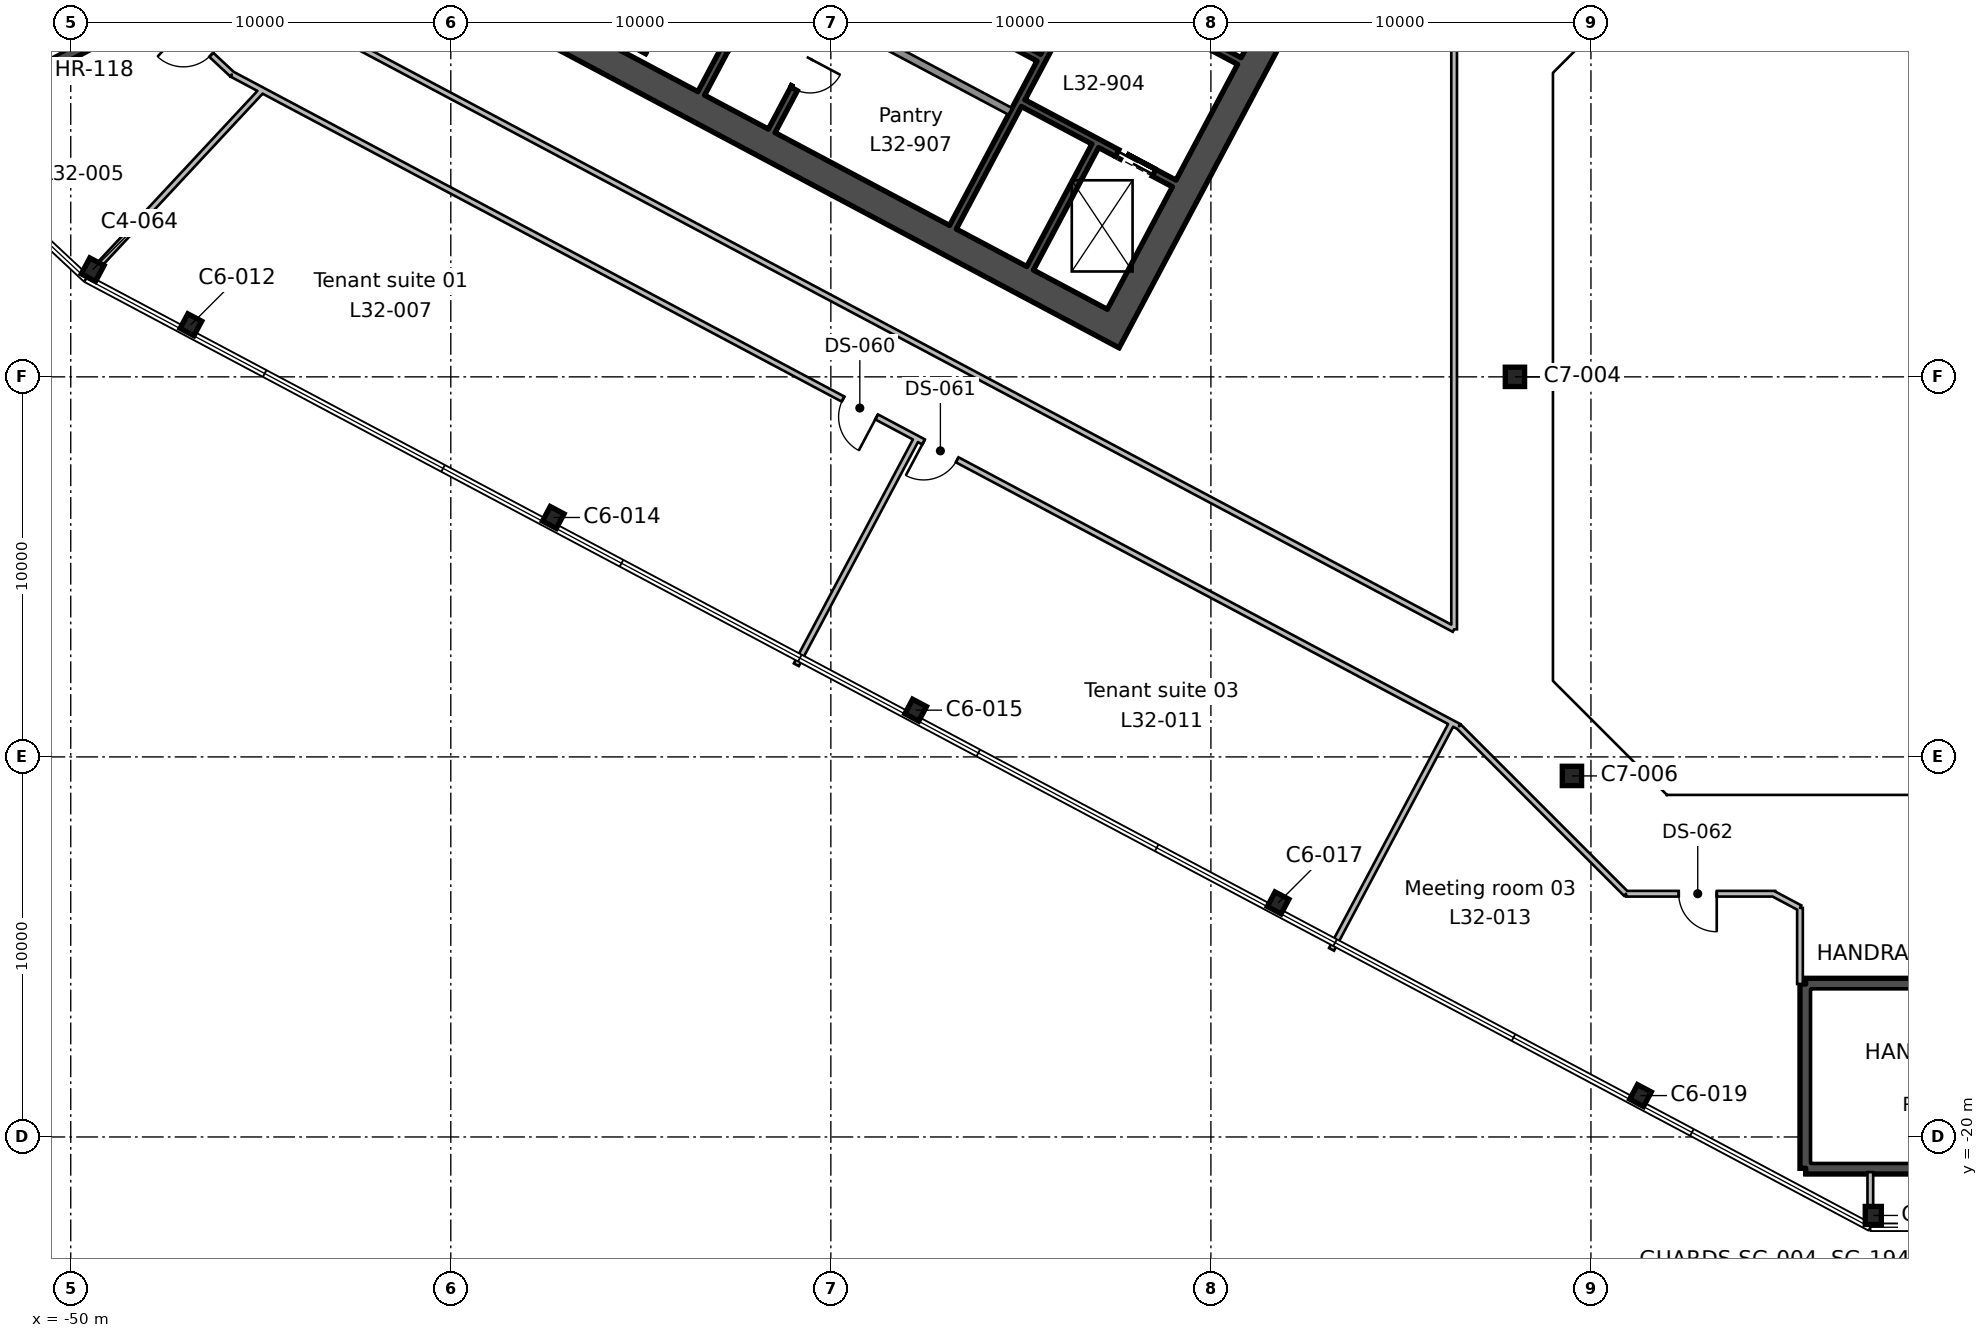
"""IFC4 building model, lengths in metres.
Left out: names, types, materials, properties, quantities, classifications, styles, units other than length and angle.
Written with IfcOpenShell. Run it as: python <this file> out.ifc"""

import sys

from ifc_helpers import new_model, si_unit, direction, frame, frame_2d, origin, origin_2d, place, context, subcontext, project, spatial, rectangle, hollow_rectangle, i_section, extrude, element, fill, save


model = new_model("IFC4")
c1 = context("Model", 3, precision=1e-05, world=origin(), true_north=direction((0.0, 1.0)))
c2 = subcontext(c1, "Body", "Model", "MODEL_VIEW")
j1 = project(units=[si_unit("LENGTHUNIT", "METRE"), si_unit("PLANEANGLEUNIT", "RADIAN")], contexts=[c1])
p1 = place(None, origin())
s1 = spatial("IfcSite", under=j1, at=p1, CompositionType="ELEMENT")
p2 = place(p1, origin())
s2 = spatial("IfcBuilding", under=s1, at=p2, CompositionType="ELEMENT")
p3 = place(p2, frame((0.0, 0.0, 154.2)))
s3 = spatial("IfcBuildingStorey", under=s2, at=p3, CompositionType="ELEMENT", Elevation=154.2)
p4 = place(p3, frame((-2.571, -22.065, 0.0), z_axis=(0.0, 0.0, 1.0), x_axis=(1.0, 0.0, 0.0)))
e1 = element("IfcColumn", 1, at=p4, inside=s3, PredefinedType="COLUMN", context=c2, shape_type="SweptSolid", body=[
    extrude(i_section(OverallWidth=0.424, OverallDepth=0.475, WebThickness=0.048, FlangeThickness=0.077, FilletRadius=0.015, at=origin_2d()), origin(), (0.0, 0.0, 1.0), 4.0),
])
for number, where, z_axis, x_axis in (
    (2, (-8.696, -18.911, 0.0), (0.0, 0.0, 1.0), (0.883, -0.469, 0.0)),
    (3, (-18.232, -13.841, 0.0), (0.0, 0.0, 1.0), (0.883, -0.469, 0.0)),
):
    element("IfcColumn", number, at=place(p3, frame(where, z_axis=z_axis, x_axis=x_axis)), inside=s3, PredefinedType="COLUMN", context=c2, shape_type="SweptSolid", body=[
        extrude(i_section(OverallWidth=0.412, OverallDepth=0.434, WebThickness=0.036, FlangeThickness=0.057, FilletRadius=0.015, at=origin_2d()), origin(), (0.0, 0.0, 1.0), 4.0),
    ])
p5 = place(p3, frame((-10.5, -10.5, 0.0), z_axis=(0.0, 0.0, 1.0), x_axis=(1.0, 0.0, 0.0)))
e4 = element("IfcColumn", 4, at=p5, inside=s3, PredefinedType="COLUMN", context=c2, shape_type="SweptSolid", body=[
    extrude(hollow_rectangle(XDim=0.508, YDim=0.508, WallThickness=0.012, InnerFilletRadius=0.006, OuterFilletRadius=0.018, at=origin_2d()), origin(), (0.0, 0.0, 1.0), 4.0),
])
for number, where, z_axis, x_axis in (
    (5, (-27.768, -8.77, 0.0), (0.0, 0.0, 1.0), (0.883, -0.469, 0.0)),
    (6, (-37.304, -3.7, 0.0), (0.0, 0.0, 1.0), (0.883, -0.469, 0.0)),
):
    element("IfcColumn", number, at=place(p3, frame(where, z_axis=z_axis, x_axis=x_axis)), inside=s3, PredefinedType="COLUMN", context=c2, shape_type="SweptSolid", body=[
        extrude(i_section(OverallWidth=0.412, OverallDepth=0.434, WebThickness=0.036, FlangeThickness=0.057, FilletRadius=0.015, at=origin_2d()), origin(), (0.0, 0.0, 1.0), 4.0),
    ])
p6 = place(p3, frame((-12.0, 0.0, 0.0), z_axis=(0.0, 0.0, 1.0), x_axis=(1.0, 0.0, 0.0)))
e7 = element("IfcColumn", 7, at=p6, inside=s3, PredefinedType="COLUMN", context=c2, shape_type="SweptSolid", body=[
    extrude(hollow_rectangle(XDim=0.508, YDim=0.508, WallThickness=0.012, InnerFilletRadius=0.006, OuterFilletRadius=0.018, at=origin_2d()), origin(), (0.0, 0.0, 1.0), 4.0),
])
p7 = place(p3, frame((-46.839, 1.37, 0.0), z_axis=(0.0, 0.0, 1.0), x_axis=(0.882947592859, -0.469471562786, 0.0)))
e8 = element("IfcColumn", 8, at=p7, inside=s3, PredefinedType="COLUMN", context=c2, shape_type="SweptSolid", body=[
    extrude(i_section(OverallWidth=0.412, OverallDepth=0.434, WebThickness=0.036, FlangeThickness=0.057, FilletRadius=0.015, at=origin_2d()), origin(), (0.0, 0.0, 1.0), 4.0),
])
p8 = place(p3, frame((-49.423, 2.82, 0.0), z_axis=(0.0, 0.0, 1.0), x_axis=(0.882947592859, -0.469471562786, 0.0)))
e9 = element("IfcColumn", 9, at=p8, inside=s3, PredefinedType="COLUMN", context=c2, shape_type="SweptSolid", body=[
    extrude(i_section(OverallWidth=0.424, OverallDepth=0.475, WebThickness=0.048, FlangeThickness=0.077, FilletRadius=0.015, at=origin_2d()), origin(), (0.0, 0.0, 1.0), 4.0),
])
p9 = place(p3, frame((-13.498, 18.333, 0.0), z_axis=(0.0, 0.0, 1.0), x_axis=(-0.469469918705, -0.88294846703, 0.0)))
e10 = element("IfcWall", 10, at=p9, inside=s3, PredefinedType="SHEAR", context=c2, shape_type="SweptSolid", body=[
    extrude(rectangle(XDim=19.7, YDim=0.75, at=frame_2d((9.85, 0.0))), origin(), (0.0, 0.0, 1.0), 4.0),
])
p10 = place(p9, frame((6.85, 0.0, 0.0)))
e11 = element("IfcOpeningElement", 11, at=p10, cuts=e10, PredefinedType="OPENING", context=c2, shape_type="SweptSolid", body=[
    extrude(rectangle(XDim=2.4, YDim=2.4, at=frame_2d((1.2, 1.2))), frame((0.0, 0.385, 0.0), z_axis=(0.0, -1.0, 0.0), x_axis=(1.0, 0.0, 0.0)), (0.0, 0.0, 1.0), 0.77),
])
p11 = place(p3, frame((-22.902, 1.446, 0.0), z_axis=(0.0, 0.0, 1.0), x_axis=(-0.88294509198, 0.469476266226, 0.0)))
e12 = element("IfcWall", 12, at=p11, inside=s3, PredefinedType="SHEAR", context=c2, shape_type="SweptSolid", body=[
    extrude(rectangle(XDim=20.2, YDim=0.75, at=frame_2d((10.1, 0.0))), origin(), (0.0, 0.0, 1.0), 4.0),
])
p12 = place(p3, frame((-23.043, 6.08, 0.0), z_axis=(0.0, 0.0, 1.0), x_axis=(-0.469494272526, -0.882935517501, 0.0)))
e13 = element("IfcWall", 13, at=p12, inside=s3, PredefinedType="SHEAR", context=c2, shape_type="SweptSolid", body=[
    extrude(rectangle(XDim=3.65, YDim=0.2, at=frame_2d((1.825, 0.0))), origin(), (0.0, 0.0, 1.0), 4.0),
])
p13 = place(p3, frame((-23.36, 10.382, 0.0), z_axis=(0.0, 0.0, 1.0), x_axis=(-0.469480409012, -0.88294288918, 0.0)))
e14 = element("IfcWall", 14, at=p13, inside=s3, PredefinedType="SHEAR", context=c2, shape_type="SweptSolid", body=[
    extrude(rectangle(XDim=7.3, YDim=0.2, at=frame_2d((3.65, 0.0))), origin(), (0.0, 0.0, 1.0), 4.0),
])
p14 = place(p3, frame((-28.128, 12.917, 0.0), z_axis=(0.0, 0.0, 1.0), x_axis=(-0.469454336211, -0.882956752176, 0.0)))
e15 = element("IfcWall", 15, at=p14, inside=s3, PredefinedType="SHEAR", context=c2, shape_type="SweptSolid", body=[
    extrude(rectangle(XDim=7.3, YDim=0.2, at=frame_2d((3.65, 0.0))), origin(), (0.0, 0.0, 1.0), 4.0),
])
p15 = place(p14, frame((2.65, 0.0, 0.0)))
e16 = element("IfcOpeningElement", 16, at=p15, cuts=e15, PredefinedType="OPENING", context=c2, shape_type="SweptSolid", body=[
    extrude(rectangle(XDim=0.9, YDim=2.1, at=frame_2d((0.45, 1.05))), frame((0.0, 0.11, 0.0), z_axis=(0.0, -1.0, 0.0), x_axis=(1.0, 0.0, 0.0)), (0.0, 0.0, 1.0), 0.22),
])
p16 = place(p14, frame((5.15, 0.0, 0.0)))
e17 = element("IfcOpeningElement", 17, at=p16, cuts=e15, PredefinedType="OPENING", context=c2, shape_type="SweptSolid", body=[
    extrude(rectangle(XDim=0.9, YDim=2.1, at=frame_2d((0.45, 1.05))), frame((0.0, 0.11, 0.0), z_axis=(0.0, -1.0, 0.0), x_axis=(1.0, 0.0, 0.0)), (0.0, 0.0, 1.0), 0.22),
])
p17 = place(p3, frame((-29.982, 13.903, 0.0), z_axis=(0.0, 0.0, 1.0), x_axis=(-0.469454336211, -0.882956752176, 0.0)))
e18 = element("IfcWall", 18, at=p17, inside=s3, PredefinedType="SHEAR", context=c2, shape_type="SweptSolid", body=[
    extrude(rectangle(XDim=7.3, YDim=0.2, at=frame_2d((3.65, 0.0))), origin(), (0.0, 0.0, 1.0), 4.0),
])
p18 = place(p17, frame((4.8, 0.0, 0.0)))
e19 = element("IfcOpeningElement", 19, at=p18, cuts=e18, PredefinedType="OPENING", context=c2, shape_type="SweptSolid", body=[
    extrude(rectangle(XDim=1.2, YDim=2.1, at=frame_2d((0.6, 1.05))), frame((0.0, 0.11, 0.0), z_axis=(0.0, -1.0, 0.0), x_axis=(1.0, 0.0, 0.0)), (0.0, 0.0, 1.0), 0.22),
])
p19 = place(p3, frame((-19.252, 8.311, 0.0), z_axis=(0.0, 0.0, 1.0), x_axis=(-0.882955722218, 0.469456273365, 0.0)))
e20 = element("IfcWall", 20, at=p19, inside=s3, PredefinedType="SHEAR", context=c2, shape_type="SweptSolid", body=[
    extrude(rectangle(XDim=10.0, YDim=0.2, at=frame_2d((5.0, 0.0))), origin(), (0.0, 0.0, 1.0), 4.0),
])
p20 = place(p19, frame((2.1, 0.0, 0.0)))
e21 = element("IfcOpeningElement", 21, at=p20, cuts=e20, PredefinedType="OPENING", context=c2, shape_type="SweptSolid", body=[
    extrude(rectangle(XDim=1.2, YDim=2.1, at=frame_2d((0.6, 1.05))), frame((0.0, 0.11, 0.0), z_axis=(0.0, -1.0, 0.0), x_axis=(1.0, 0.0, 0.0)), (0.0, 0.0, 1.0), 0.22),
])
p21 = place(p3, frame((-24.528, 8.398, 0.0), z_axis=(0.0, 0.0, 1.0), x_axis=(-0.882953967957, 0.469459572775, 0.0)))
e22 = element("IfcWall", 22, at=p21, inside=s3, PredefinedType="SHEAR", context=c2, shape_type="SweptSolid", body=[
    extrude(rectangle(XDim=5.2, YDim=0.2, at=frame_2d((2.6, 0.0))), origin(), (0.0, 0.0, 1.0), 4.0),
])
p22 = place(p3, frame((-20.965, 5.088, 0.0), z_axis=(0.0, 0.0, 1.0), x_axis=(-0.882925986334, 0.469512196493, 0.0)))
e23 = element("IfcWall", 23, at=p22, inside=s3, PredefinedType="SHEAR", context=c2, shape_type="SweptSolid", body=[
    extrude(rectangle(XDim=4.5, YDim=0.2, at=frame_2d((2.25, 0.0))), origin(), (0.0, 0.0, 1.0), 4.0),
])
p23 = place(p22, frame((0.6, 0.0, 0.0)))
e24 = element("IfcOpeningElement", 24, at=p23, cuts=e23, PredefinedType="OPENING", context=c2, shape_type="SweptSolid", body=[
    extrude(rectangle(XDim=1.1, YDim=2.1, at=frame_2d((0.55, 1.05))), frame((0.0, 0.11, 0.0), z_axis=(0.0, -1.0, 0.0), x_axis=(1.0, 0.0, 0.0)), (0.0, 0.0, 1.0), 0.22),
])
p24 = place(p3, frame((-25.28, 6.986, 0.0), z_axis=(0.0, 0.0, 1.0), x_axis=(-0.882934506056, 0.469496174655, 0.0)))
e25 = element("IfcWall", 25, at=p24, inside=s3, PredefinedType="SOLIDWALL", context=c2, shape_type="SweptSolid", body=[
    extrude(rectangle(XDim=5.2, YDim=0.2, at=frame_2d((2.6, 0.0))), origin(), (0.0, 0.0, 1.0), 4.0),
])
p25 = place(p3, frame((3.95, -20.825, 0.0), z_axis=(0.0, 0.0, 1.0), x_axis=(-1.0, 0.0, 0.0)))
e26 = element("IfcWall", 26, at=p25, inside=s3, PredefinedType="SHEAR", context=c2, shape_type="SweptSolid", body=[
    extrude(rectangle(XDim=8.3, YDim=0.3, at=frame_2d((4.15, 0.0))), origin(), (0.0, 0.0, 1.0), 4.0),
])
p26 = place(p3, frame((-4.35, -20.825, 0.0), z_axis=(0.0, 0.0, 1.0), x_axis=(0.0, 1.0, 0.0)))
e27 = element("IfcWall", 27, at=p26, inside=s3, PredefinedType="SHEAR", context=c2, shape_type="SweptSolid", body=[
    extrude(rectangle(XDim=4.85, YDim=0.3, at=frame_2d((2.425, 0.0))), origin(), (0.0, 0.0, 1.0), 4.0),
])
p27 = place(p3, frame((-4.35, -15.975, 0.0), z_axis=(0.0, 0.0, 1.0), x_axis=(1.0, 0.0, 0.0)))
e28 = element("IfcWall", 28, at=p27, inside=s3, PredefinedType="SHEAR", context=c2, shape_type="SweptSolid", body=[
    extrude(rectangle(XDim=8.3, YDim=0.3, at=frame_2d((4.15, 0.0))), origin(), (0.0, 0.0, 1.0), 4.0),
])
p28 = place(p27, frame((6.05, 0.0, 0.0)))
e29 = element("IfcOpeningElement", 29, at=p28, cuts=e28, PredefinedType="OPENING", context=c2, shape_type="SweptSolid", body=[
    extrude(rectangle(XDim=1.9, YDim=2.1, at=frame_2d((0.95, 1.05))), frame((0.0, 0.16, 0.0), z_axis=(0.0, -1.0, 0.0), x_axis=(1.0, 0.0, 0.0)), (0.0, 0.0, 1.0), 0.32),
])
p29 = place(p3, frame((-45.297, 11.007, 0.0), z_axis=(0.0, 0.0, 1.0), x_axis=(-0.882951519127, -0.469464178475, 0.0)))
e30 = element("IfcWall", 30, at=p29, inside=s3, PredefinedType="SHEAR", context=c2, shape_type="SweptSolid", body=[
    extrude(rectangle(XDim=8.3, YDim=0.3, at=frame_2d((4.15, 0.0))), origin(), (0.0, 0.0, 1.0), 4.0),
])
p30 = place(p3, frame((-44.967, 7.544, 0.0), z_axis=(0.0, 0.0, 1.0), x_axis=(-0.681977908196, -0.731372772759, 0.0)))
e31 = element("IfcWall", 31, at=p30, inside=s3, PredefinedType="PARTITIONING", context=c2, shape_type="SweptSolid", body=[
    extrude(rectangle(XDim=6.238, YDim=0.15, at=frame_2d((3.119, 0.0))), origin(), (0.0, 0.0, 1.0), 3.64),
])
p31 = place(p3, frame((-27.739, -1.616, 0.0), z_axis=(0.0, 0.0, 1.0), x_axis=(-0.469581783496, -0.882888978643, 0.0)))
e32 = element("IfcWall", 32, at=p31, inside=s3, PredefinedType="PARTITIONING", context=c2, shape_type="SweptSolid", body=[
    extrude(rectangle(XDim=6.75, YDim=0.15, at=frame_2d((3.375, 0.0))), origin(), (0.0, 0.0, 1.0), 3.64),
])
p32 = place(p3, frame((-45.02, 7.572, 0.0), z_axis=(0.0, 0.0, 1.0), x_axis=(-0.88288015149, 0.46959837958, 0.0)))
e33 = element("IfcWall", 33, at=p32, inside=s3, PredefinedType="PARTITIONING", context=c2, shape_type="SweptSolid", body=[
    extrude(rectangle(XDim=0.832, YDim=0.15, at=frame_2d((0.416, 0.0))), origin(), (0.0, 0.0, 1.0), 3.64),
])
p33 = place(p3, frame((-45.755, 7.963, 0.0), z_axis=(0.0, 0.0, 1.0), x_axis=(-0.731175081237, 0.682189856695, 0.0)))
e34 = element("IfcWall", 34, at=p33, inside=s3, PredefinedType="PARTITIONING", context=c2, shape_type="SweptSolid", body=[
    extrude(rectangle(XDim=2.507, YDim=0.15, at=frame_2d((1.253, 0.0))), origin(), (0.0, 0.0, 1.0), 3.64),
])
p34 = place(p33, frame((0.75, 0.0, 0.0)))
e35 = element("IfcOpeningElement", 35, at=p34, cuts=e34, PredefinedType="OPENING", context=c2, shape_type="SweptSolid", body=[
    extrude(rectangle(XDim=1.0, YDim=2.1, at=frame_2d((0.5, 1.05))), frame((0.0, 0.085, 0.0), z_axis=(0.0, -1.0, 0.0), x_axis=(1.0, 0.0, 0.0)), (0.0, 0.0, 1.0), 0.17),
])
p35 = place(p3, frame((-13.6, 9.077, 0.0), z_axis=(0.0, 0.0, 1.0), x_axis=(0.0, -1.0, 0.0)))
e36 = element("IfcWall", 36, at=p35, inside=s3, PredefinedType="PARTITIONING", context=c2, shape_type="SweptSolid", body=[
    extrude(rectangle(XDim=15.72, YDim=0.15, at=frame_2d((7.86, 0.0))), origin(), (0.0, 0.0, 1.0), 3.64),
])
p36 = place(p3, frame((-13.6, -6.643, 0.0), z_axis=(0.0, 0.0, 1.0), x_axis=(-0.882949199944, 0.469468540287, 0.0)))
e37 = element("IfcWall", 37, at=p36, inside=s3, PredefinedType="PARTITIONING", context=c2, shape_type="SweptSolid", body=[
    extrude(rectangle(XDim=34.959, YDim=0.15, at=frame_2d((17.479, 0.0))), origin(), (0.0, 0.0, 1.0), 3.64),
])
p37 = place(p3, frame((-13.477, -9.2, 0.0), z_axis=(0.0, 0.0, 1.0), x_axis=(-0.882944359403, 0.469477643981, 0.0)))
e38 = element("IfcWall", 38, at=p37, inside=s3, PredefinedType="PARTITIONING", context=c2, shape_type="SweptSolid", body=[
    extrude(rectangle(XDim=35.725, YDim=0.15, at=frame_2d((17.862, 0.0))), origin(), (0.0, 0.0, 1.0), 3.64),
])
p38 = place(p37, frame((17.35, 0.0, 0.0)))
e39 = element("IfcOpeningElement", 39, at=p38, cuts=e38, PredefinedType="OPENING", context=c2, shape_type="SweptSolid", body=[
    extrude(rectangle(XDim=1.0, YDim=2.1, at=frame_2d((0.5, 1.05))), frame((0.0, 0.085, 0.0), z_axis=(0.0, -1.0, 0.0), x_axis=(1.0, 0.0, 0.0)), (0.0, 0.0, 1.0), 0.17),
])
p39 = place(p37, frame((14.949, 0.0, 0.0)))
e40 = element("IfcOpeningElement", 40, at=p39, cuts=e38, PredefinedType="OPENING", context=c2, shape_type="SweptSolid", body=[
    extrude(rectangle(XDim=1.0, YDim=2.1, at=frame_2d((0.5, 1.05))), frame((0.0, 0.085, 0.0), z_axis=(0.0, -1.0, 0.0), x_axis=(1.0, 0.0, 0.0)), (0.0, 0.0, 1.0), 0.17),
])
p40 = place(p3, frame((-13.657, -9.104, 0.0), z_axis=(0.0, 0.0, 1.0), x_axis=(-0.469469006851, -0.882948951869, 0.0)))
e41 = element("IfcWall", 41, at=p40, inside=s3, PredefinedType="PARTITIONING", context=c2, shape_type="SweptSolid", body=[
    extrude(rectangle(XDim=6.75, YDim=0.15, at=frame_2d((3.375, 0.0))), origin(), (0.0, 0.0, 1.0), 3.64),
])
p41 = place(p3, frame((-5.151, -13.6, 0.0), z_axis=(0.0, 0.0, 1.0), x_axis=(-1.0, 0.0, 0.0)))
e42 = element("IfcWall", 42, at=p41, inside=s3, PredefinedType="PARTITIONING", context=c2, shape_type="SweptSolid", body=[
    extrude(rectangle(XDim=3.926, YDim=0.15, at=frame_2d((1.963, 0.0))), origin(), (0.0, 0.0, 1.0), 3.64),
])
p42 = place(p41, frame((1.539, 0.0, 0.0)))
e43 = element("IfcOpeningElement", 43, at=p42, cuts=e42, PredefinedType="OPENING", context=c2, shape_type="SweptSolid", body=[
    extrude(rectangle(XDim=1.0, YDim=2.1, at=frame_2d((0.5, 1.05))), frame((0.0, 0.085, 0.0), z_axis=(0.0, -1.0, 0.0), x_axis=(1.0, 0.0, 0.0)), (0.0, 0.0, 1.0), 0.17),
])
p43 = place(p3, frame((-9.077, -13.6, 0.0), z_axis=(0.0, 0.0, 1.0), x_axis=(-0.707106781187, 0.707106781187, 0.0)))
e44 = element("IfcWall", 44, at=p43, inside=s3, PredefinedType="PARTITIONING", context=c2, shape_type="SweptSolid", body=[
    extrude(rectangle(XDim=6.223, YDim=0.15, at=frame_2d((3.111, 0.0))), origin(), (0.0, 0.0, 1.0), 3.64),
])
p44 = place(p3, frame((-4.5, -13.973, 0.0), z_axis=(0.0, 0.0, 1.0), x_axis=(-0.882888665287, 0.469582372655, 0.0)))
e45 = element("IfcWall", 45, at=p44, inside=s3, PredefinedType="PARTITIONING", context=c2, shape_type="SweptSolid", body=[
    extrude(rectangle(XDim=0.794, YDim=0.15, at=frame_2d((0.397, 0.0))), origin(), (0.0, 0.0, 1.0), 3.64),
])
p45 = place(p3, frame((-4.5, -13.973, 0.0), z_axis=(0.0, 0.0, 1.0), x_axis=(0.0, -1.0, 0.0)))
e46 = element("IfcWall", 46, at=p45, inside=s3, PredefinedType="PARTITIONING", context=c2, shape_type="SweptSolid", body=[
    extrude(rectangle(XDim=2.002, YDim=0.15, at=frame_2d((1.001, 0.0))), origin(), (0.0, 0.0, 1.0), 3.64),
])
p46 = place(p3, frame((-2.649, -20.925, 0.0), z_axis=(0.0, 0.0, 1.0), x_axis=(0.0, -1.0, 0.0)))
e47 = element("IfcWall", 47, at=p46, inside=s3, PredefinedType="PARTITIONING", context=c2, shape_type="SweptSolid", body=[
    extrude(rectangle(XDim=0.903, YDim=0.15, at=frame_2d((0.451, 0.0))), origin(), (0.0, 0.0, 1.0), 3.64),
])
p47 = place(p23, origin())
e48 = element("IfcDoor", 48, at=p47, inside=s3, OperationType="DOUBLE_DOOR_SLIDING", PredefinedType="DOOR", context=c2, shape_type="SweptSolid", body=[
    extrude(rectangle(XDim=1.1, YDim=2.1, at=frame_2d((0.55, 1.05))), frame((0.0, 0.025, 0.0), z_axis=(0.0, -1.0, 0.0), x_axis=(1.0, 0.0, 0.0)), (0.0, 0.0, 1.0), 0.05),
])
fill(e24, e48)
p48 = place(p16, origin())
e49 = element("IfcDoor", 49, at=p48, inside=s3, OperationType="SINGLE_SWING_LEFT", PredefinedType="DOOR", context=c2, shape_type="SweptSolid", body=[
    extrude(rectangle(XDim=0.9, YDim=2.1, at=frame_2d((0.45, 1.05))), frame((0.0, 0.025, 0.0), z_axis=(0.0, -1.0, 0.0), x_axis=(1.0, 0.0, 0.0)), (0.0, 0.0, 1.0), 0.05),
])
fill(e17, e49)
p49 = place(p34, origin())
e50 = element("IfcDoor", 50, at=p49, inside=s3, OperationType="SINGLE_SWING_RIGHT", PredefinedType="DOOR", context=c2, shape_type="SweptSolid", body=[
    extrude(rectangle(XDim=1.0, YDim=2.1, at=frame_2d((0.5, 1.05))), frame((0.0, 0.025, 0.0), z_axis=(0.0, -1.0, 0.0), x_axis=(1.0, 0.0, 0.0)), (0.0, 0.0, 1.0), 0.05),
])
fill(e35, e50)
p50 = place(p38, origin())
e51 = element("IfcDoor", 51, at=p50, inside=s3, OperationType="SINGLE_SWING_LEFT", PredefinedType="DOOR", context=c2, shape_type="SweptSolid", body=[
    extrude(rectangle(XDim=1.0, YDim=2.1, at=frame_2d((0.5, 1.05))), frame((0.0, 0.025, 0.0), z_axis=(0.0, -1.0, 0.0), x_axis=(1.0, 0.0, 0.0)), (0.0, 0.0, 1.0), 0.05),
])
fill(e39, e51)
p51 = place(p39, origin())
e52 = element("IfcDoor", 52, at=p51, inside=s3, OperationType="SINGLE_SWING_RIGHT", PredefinedType="DOOR", context=c2, shape_type="SweptSolid", body=[
    extrude(rectangle(XDim=1.0, YDim=2.1, at=frame_2d((0.5, 1.05))), frame((0.0, 0.025, 0.0), z_axis=(0.0, -1.0, 0.0), x_axis=(1.0, 0.0, 0.0)), (0.0, 0.0, 1.0), 0.05),
])
fill(e40, e52)
p52 = place(p42, origin())
e53 = element("IfcDoor", 53, at=p52, inside=s3, OperationType="SINGLE_SWING_LEFT", PredefinedType="DOOR", context=c2, shape_type="SweptSolid", body=[
    extrude(rectangle(XDim=1.0, YDim=2.1, at=frame_2d((0.5, 1.05))), frame((0.0, 0.025, 0.0), z_axis=(0.0, -1.0, 0.0), x_axis=(1.0, 0.0, 0.0)), (0.0, 0.0, 1.0), 0.05),
])
fill(e43, e53)
save(model, sys.argv[1])
